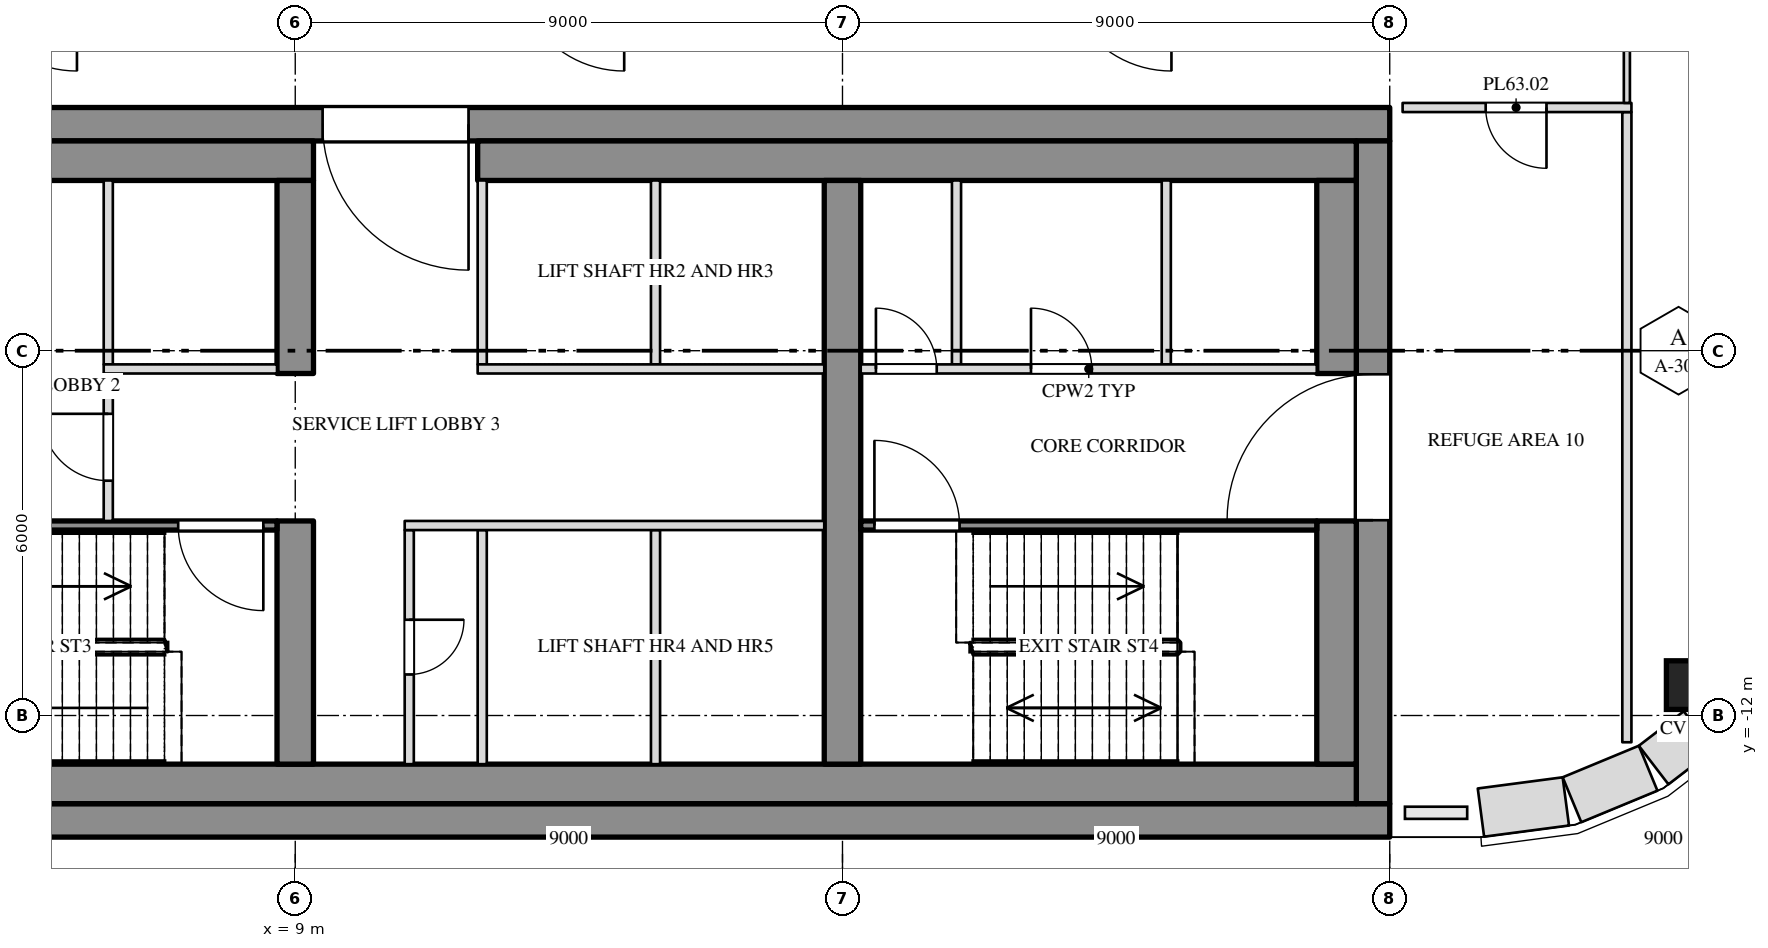
"""IFC4 building model, lengths in metres.
Left out: names, types, materials, properties, quantities, classifications, styles, units other than length and angle.
Written with IfcOpenShell. Run it as: python <this file> out.ifc"""

import sys

from ifc_helpers import new_model, si_unit, direction, frame, frame_2d, origin, origin_2d, place, context, subcontext, project, spatial, rectangle, extrude, element, fill, save


model = new_model("IFC4")
c1 = context("Model", 3, precision=1e-05, world=origin(), true_north=direction((0.0, 1.0)))
c2 = subcontext(c1, "Body", "Model", "MODEL_VIEW")
j1 = project(units=[si_unit("LENGTHUNIT", "METRE"), si_unit("PLANEANGLEUNIT", "RADIAN")], contexts=[c1])
p1 = place(None, origin())
s1 = spatial("IfcSite", under=j1, at=p1, CompositionType="ELEMENT")
p2 = place(p1, origin())
s2 = spatial("IfcBuilding", under=s1, at=p2, CompositionType="ELEMENT")
p3 = place(p2, frame((0.0, 0.0, 268.5)))
s3 = spatial("IfcBuildingStorey", under=s2, at=p3, CompositionType="ELEMENT", Elevation=268.5)
p4 = place(p3, frame((31.95, -11.5, 0.0), z_axis=(0.0, 0.0, 1.0), x_axis=(1.0, 0.0, 0.0)))
e1 = element("IfcColumn", 1, at=p4, inside=s3, PredefinedType="COLUMN", context=c2, shape_type="SweptSolid", body=[
    extrude(rectangle(XDim=0.8, YDim=0.8, at=origin_2d()), origin(), (0.0, 0.0, 1.0), 4.0),
])
p5 = place(p3, frame((-27.0, -2.275, 0.0), z_axis=(0.0, 0.0, 1.0), x_axis=(1.0, 0.0, 0.0)))
e2 = element("IfcWall", 2, at=p5, inside=s3, PredefinedType="SHEAR", context=c2, shape_type="SweptSolid", body=[
    extrude(rectangle(XDim=54.0, YDim=0.55, at=frame_2d((27.0, 0.0))), origin(), (0.0, 0.0, 1.0), 3.78),
])
p6 = place(p5, frame((15.15, 0.0, 0.0)))
e3 = element("IfcOpeningElement", 3, at=p6, cuts=e2, PredefinedType="OPENING", context=c2, shape_type="SweptSolid", body=[
    extrude(rectangle(XDim=2.4, YDim=2.1, at=frame_2d((1.2, 1.05))), frame((0.0, 0.287, 0.0), z_axis=(0.0, -1.0, 0.0), x_axis=(1.0, 0.0, 0.0)), (0.0, 0.0, 1.0), 0.574),
])
p7 = place(p5, frame((36.45, 0.0, 0.0)))
e4 = element("IfcOpeningElement", 4, at=p7, cuts=e2, PredefinedType="OPENING", context=c2, shape_type="SweptSolid", body=[
    extrude(rectangle(XDim=2.4, YDim=2.1, at=frame_2d((1.2, 1.05))), frame((0.0, 0.287, 0.0), z_axis=(0.0, -1.0, 0.0), x_axis=(1.0, 0.0, 0.0)), (0.0, 0.0, 1.0), 0.574),
])
p8 = place(p3, frame((-27.0, -13.725, 0.0), z_axis=(0.0, 0.0, 1.0), x_axis=(1.0, 0.0, 0.0)))
e5 = element("IfcWall", 5, at=p8, inside=s3, PredefinedType="SHEAR", context=c2, shape_type="SweptSolid", body=[
    extrude(rectangle(XDim=54.0, YDim=0.55, at=frame_2d((27.0, 0.0))), origin(), (0.0, 0.0, 1.0), 3.78),
])
p9 = place(p3, frame((26.725, -13.45, 0.0), z_axis=(0.0, 0.0, 1.0), x_axis=(0.0, 1.0, 0.0)))
e6 = element("IfcWall", 6, at=p9, inside=s3, PredefinedType="SHEAR", context=c2, shape_type="SweptSolid", body=[
    extrude(rectangle(XDim=10.9, YDim=0.55, at=frame_2d((5.45, 0.0))), origin(), (0.0, 0.0, 1.0), 3.78),
])
p10 = place(p9, frame((4.662, 0.0, 0.0)))
e7 = element("IfcOpeningElement", 7, at=p10, cuts=e6, PredefinedType="OPENING", context=c2, shape_type="SweptSolid", body=[
    extrude(rectangle(XDim=2.4, YDim=2.1, at=frame_2d((1.2, 1.05))), frame((0.0, 0.287, 0.0), z_axis=(0.0, -1.0, 0.0), x_axis=(1.0, 0.0, 0.0)), (0.0, 0.0, 1.0), 0.574),
])
p11 = place(p3, frame((-9.3, -2.875, 0.0), z_axis=(0.0, 0.0, 1.0), x_axis=(1.0, 0.0, 0.0)))
e8 = element("IfcWall", 8, at=p11, inside=s3, PredefinedType="SHEAR", context=c2, shape_type="SweptSolid", body=[
    extrude(rectangle(XDim=18.6, YDim=0.65, at=frame_2d((9.3, 0.0))), origin(), (0.0, 0.0, 1.0), 3.78),
])
p12 = place(p3, frame((12.0, -2.875, 0.0), z_axis=(0.0, 0.0, 1.0), x_axis=(1.0, 0.0, 0.0)))
e9 = element("IfcWall", 9, at=p12, inside=s3, PredefinedType="SHEAR", context=c2, shape_type="SweptSolid", body=[
    extrude(rectangle(XDim=14.45, YDim=0.65, at=frame_2d((7.225, 0.0))), origin(), (0.0, 0.0, 1.0), 3.78),
])
p13 = place(p3, frame((-26.45, -13.125, 0.0), z_axis=(0.0, 0.0, 1.0), x_axis=(1.0, 0.0, 0.0)))
e10 = element("IfcWall", 10, at=p13, inside=s3, PredefinedType="SHEAR", context=c2, shape_type="SweptSolid", body=[
    extrude(rectangle(XDim=52.9, YDim=0.65, at=frame_2d((26.45, 0.0))), origin(), (0.0, 0.0, 1.0), 3.78),
])
p14 = place(p3, frame((26.125, -12.8, 0.0), z_axis=(0.0, 0.0, 1.0), x_axis=(0.0, 1.0, 0.0)))
e11 = element("IfcWall", 11, at=p14, inside=s3, PredefinedType="SHEAR", context=c2, shape_type="SweptSolid", body=[
    extrude(rectangle(XDim=4.0, YDim=0.65, at=frame_2d((2.0, 0.0))), origin(), (0.0, 0.0, 1.0), 3.78),
])
p15 = place(p3, frame((26.125, -6.375, 0.0), z_axis=(0.0, 0.0, 1.0), x_axis=(0.0, 1.0, 0.0)))
e12 = element("IfcWall", 12, at=p15, inside=s3, PredefinedType="SHEAR", context=c2, shape_type="SweptSolid", body=[
    extrude(rectangle(XDim=3.175, YDim=0.65, at=frame_2d((1.587, 0.0))), origin(), (0.0, 0.0, 1.0), 3.78),
])
p16 = place(p3, frame((9.0, -12.8, 0.0), z_axis=(0.0, 0.0, 1.0), x_axis=(0.0, 1.0, 0.0)))
e13 = element("IfcWall", 13, at=p16, inside=s3, PredefinedType="SHEAR", context=c2, shape_type="SweptSolid", body=[
    extrude(rectangle(XDim=4.0, YDim=0.6, at=frame_2d((2.0, 0.0))), origin(), (0.0, 0.0, 1.0), 3.78),
])
p17 = place(p3, frame((9.0, -6.375, 0.0), z_axis=(0.0, 0.0, 1.0), x_axis=(0.0, 1.0, 0.0)))
e14 = element("IfcWall", 14, at=p17, inside=s3, PredefinedType="SHEAR", context=c2, shape_type="SweptSolid", body=[
    extrude(rectangle(XDim=3.175, YDim=0.6, at=frame_2d((1.587, 0.0))), origin(), (0.0, 0.0, 1.0), 3.78),
])
p18 = place(p3, frame((18.0, -12.8, 0.0), z_axis=(0.0, 0.0, 1.0), x_axis=(0.0, 1.0, 0.0)))
e15 = element("IfcWall", 15, at=p18, inside=s3, PredefinedType="SHEAR", context=c2, shape_type="SweptSolid", body=[
    extrude(rectangle(XDim=9.6, YDim=0.6, at=frame_2d((4.8, 0.0))), origin(), (0.0, 0.0, 1.0), 3.78),
])
p19 = place(p3, frame((30.9, -12.44, 0.0), z_axis=(0.0, 0.0, 1.0), x_axis=(0.0, 1.0, 0.0)))
e16 = element("IfcWall", 16, at=p19, inside=s3, PredefinedType="PARTITIONING", context=c2, shape_type="SweptSolid", body=[
    extrude(rectangle(XDim=10.365, YDim=0.15, at=frame_2d((5.183, 0.0))), origin(), (0.0, 0.0, 1.0), 3.78),
])
p20 = place(p3, frame((27.212, -2.0, 0.0), z_axis=(0.0, 0.0, 1.0), x_axis=(1.0, 0.0, 0.0)))
e17 = element("IfcWall", 17, at=p20, inside=s3, PredefinedType="PARTITIONING", context=c2, shape_type="SweptSolid", body=[
    extrude(rectangle(XDim=3.763, YDim=0.15, at=frame_2d((1.882, 0.0))), origin(), (0.0, 0.0, 1.0), 3.78),
])
p21 = place(p20, frame((1.366, 0.0, 0.0)))
e18 = element("IfcOpeningElement", 18, at=p21, cuts=e17, PredefinedType="OPENING", context=c2, shape_type="SweptSolid", body=[
    extrude(rectangle(XDim=1.0, YDim=2.1, at=frame_2d((0.5, 1.05))), frame((0.0, 0.087, 0.0), z_axis=(0.0, -1.0, 0.0), x_axis=(1.0, 0.0, 0.0)), (0.0, 0.0, 1.0), 0.174),
])
p22 = place(p3, frame((30.9, -1.925, 0.0), z_axis=(0.0, 0.0, 1.0), x_axis=(0.0, 1.0, 0.0)))
e19 = element("IfcWall", 19, at=p22, inside=s3, PredefinedType="PARTITIONING", context=c2, shape_type="SweptSolid", body=[
    extrude(rectangle(XDim=2.25, YDim=0.1, at=frame_2d((1.125, 0.0))), origin(), (0.0, 0.0, 1.0), 3.78),
])
p23 = place(p3, frame((28.5, -13.597, 0.0), z_axis=(0.0, 0.0, 1.0), x_axis=(0.99144603414, 0.130517283865, 0.0)))
e20 = element("IfcWall", 20, at=p23, inside=s3, PredefinedType="SOLIDWALL", context=c2, shape_type="SweptSolid", body=[
    extrude(rectangle(XDim=1.408, YDim=0.8, at=frame_2d((0.704, 0.0))), origin(), (0.0, 0.0, 1.0), 3.78),
])
p24 = place(p3, frame((29.997, -13.386, 0.0), z_axis=(0.0, 0.0, 1.0), x_axis=(0.923847774587, 0.38276009378, 0.0)))
e21 = element("IfcWall", 21, at=p24, inside=s3, PredefinedType="SOLIDWALL", context=c2, shape_type="SweptSolid", body=[
    extrude(rectangle(XDim=1.355, YDim=0.8, at=frame_2d((0.678, 0.0))), origin(), (0.0, 0.0, 1.0), 3.78),
])
p25 = place(p3, frame((31.34, -12.815, 0.0), z_axis=(0.0, 0.0, 1.0), x_axis=(0.793344662299, 0.608772738221, 0.0)))
e22 = element("IfcWall", 22, at=p25, inside=s3, PredefinedType="SOLIDWALL", context=c2, shape_type="SweptSolid", body=[
    extrude(rectangle(XDim=0.931, YDim=0.8, at=frame_2d((0.466, 0.0))), origin(), (0.0, 0.0, 1.0), 3.78),
])
for number, where, z_axis, x_axis in (
    (23, (5.925, -6.225, 0.0), (0.0, 0.0, 1.0), (0.0, 1.0, 0.0)),
    (24, (12.075, -6.225, 0.0), (0.0, 0.0, 1.0), (0.0, 1.0, 0.0)),
    (25, (14.925, -6.225, 0.0), (0.0, 0.0, 1.0), (0.0, 1.0, 0.0)),
    (26, (19.875, -6.225, 0.0), (0.0, 0.0, 1.0), (0.0, 1.0, 0.0)),
    (27, (23.325, -6.225, 0.0), (0.0, 0.0, 1.0), (0.0, 1.0, 0.0)),
):
    element("IfcWall", number, at=place(p3, frame(where, z_axis=z_axis, x_axis=x_axis)), inside=s3, PredefinedType="PARTITIONING", context=c2, shape_type="SweptSolid", body=[
        extrude(rectangle(XDim=3.025, YDim=0.15, at=frame_2d((1.513, 0.0))), origin(), (0.0, 0.0, 1.0), 3.78),
    ])
p26 = place(p3, frame((10.875, -12.8, 0.0), z_axis=(0.0, 0.0, 1.0), x_axis=(0.0, 1.0, 0.0)))
e28 = element("IfcWall", 28, at=p26, inside=s3, PredefinedType="PARTITIONING", context=c2, shape_type="SweptSolid", body=[
    extrude(rectangle(XDim=3.85, YDim=0.15, at=frame_2d((1.925, 0.0))), origin(), (0.0, 0.0, 1.0), 3.78),
])
p27 = place(p26, frame((1.475, 0.0, 0.0)))
e29 = element("IfcOpeningElement", 29, at=p27, cuts=e28, PredefinedType="OPENING", context=c2, shape_type="SweptSolid", body=[
    extrude(rectangle(XDim=0.9, YDim=2.1, at=frame_2d((0.45, 1.05))), frame((0.0, 0.087, 0.0), z_axis=(0.0, -1.0, 0.0), x_axis=(1.0, 0.0, 0.0)), (0.0, 0.0, 1.0), 0.174),
])
for number, where, z_axis, x_axis in (
    (30, (12.075, -12.8, 0.0), (0.0, 0.0, 1.0), (0.0, 1.0, 0.0)),
    (31, (14.925, -12.8, 0.0), (0.0, 0.0, 1.0), (0.0, 1.0, 0.0)),
):
    element("IfcWall", number, at=place(p3, frame(where, z_axis=z_axis, x_axis=x_axis)), inside=s3, PredefinedType="PARTITIONING", context=c2, shape_type="SweptSolid", body=[
        extrude(rectangle(XDim=3.85, YDim=0.15, at=frame_2d((1.925, 0.0))), origin(), (0.0, 0.0, 1.0), 3.78),
    ])
p28 = place(p3, frame((5.925, -8.8, 0.0), z_axis=(0.0, 0.0, 1.0), x_axis=(0.0, 1.0, 0.0)))
e32 = element("IfcWall", 32, at=p28, inside=s3, PredefinedType="PARTITIONING", context=c2, shape_type="SweptSolid", body=[
    extrude(rectangle(XDim=2.425, YDim=0.15, at=frame_2d((1.212, 0.0))), origin(), (0.0, 0.0, 1.0), 3.78),
])
p29 = place(p28, frame((0.662, 0.0, 0.0)))
e33 = element("IfcOpeningElement", 33, at=p29, cuts=e32, PredefinedType="OPENING", context=c2, shape_type="SweptSolid", body=[
    extrude(rectangle(XDim=1.1, YDim=2.1, at=frame_2d((0.55, 1.05))), frame((0.0, 0.087, 0.0), z_axis=(0.0, -1.0, 0.0), x_axis=(1.0, 0.0, 0.0)), (0.0, 0.0, 1.0), 0.174),
])
p30 = place(p3, frame((5.85, -6.3, 0.0), z_axis=(0.0, 0.0, 1.0), x_axis=(1.0, 0.0, 0.0)))
e34 = element("IfcWall", 34, at=p30, inside=s3, PredefinedType="PARTITIONING", context=c2, shape_type="SweptSolid", body=[
    extrude(rectangle(XDim=2.85, YDim=0.15, at=frame_2d((1.425, 0.0))), origin(), (0.0, 0.0, 1.0), 3.78),
])
p31 = place(p3, frame((12.0, -6.3, 0.0), z_axis=(0.0, 0.0, 1.0), x_axis=(1.0, 0.0, 0.0)))
e35 = element("IfcWall", 35, at=p31, inside=s3, PredefinedType="PARTITIONING", context=c2, shape_type="SweptSolid", body=[
    extrude(rectangle(XDim=5.7, YDim=0.15, at=frame_2d((2.85, 0.0))), origin(), (0.0, 0.0, 1.0), 3.78),
])
p32 = place(p3, frame((18.3, -6.3, 0.0), z_axis=(0.0, 0.0, 1.0), x_axis=(1.0, 0.0, 0.0)))
e36 = element("IfcWall", 36, at=p32, inside=s3, PredefinedType="PARTITIONING", context=c2, shape_type="SweptSolid", body=[
    extrude(rectangle(XDim=7.5, YDim=0.15, at=frame_2d((3.75, 0.0))), origin(), (0.0, 0.0, 1.0), 3.78),
])
p33 = place(p32, frame((0.25, 0.0, 0.0)))
e37 = element("IfcOpeningElement", 37, at=p33, cuts=e36, PredefinedType="OPENING", context=c2, shape_type="SweptSolid", body=[
    extrude(rectangle(XDim=1.0, YDim=2.1, at=frame_2d((0.5, 1.05))), frame((0.0, 0.087, 0.0), z_axis=(0.0, -1.0, 0.0), x_axis=(1.0, 0.0, 0.0)), (0.0, 0.0, 1.0), 0.174),
])
p34 = place(p32, frame((2.8, 0.0, 0.0)))
e38 = element("IfcOpeningElement", 38, at=p34, cuts=e36, PredefinedType="OPENING", context=c2, shape_type="SweptSolid", body=[
    extrude(rectangle(XDim=1.0, YDim=2.1, at=frame_2d((0.5, 1.05))), frame((0.0, 0.087, 0.0), z_axis=(0.0, -1.0, 0.0), x_axis=(1.0, 0.0, 0.0)), (0.0, 0.0, 1.0), 0.174),
])
p35 = place(p3, frame((0.3, -8.875, 0.0), z_axis=(0.0, 0.0, 1.0), x_axis=(1.0, 0.0, 0.0)))
e39 = element("IfcWall", 39, at=p35, inside=s3, PredefinedType="SHEAR", context=c2, shape_type="SweptSolid", body=[
    extrude(rectangle(XDim=8.4, YDim=0.15, at=frame_2d((4.2, 0.0))), origin(), (0.0, 0.0, 1.0), 3.78),
])
p36 = place(p35, frame((6.775, 0.0, 0.0)))
e40 = element("IfcOpeningElement", 40, at=p36, cuts=e39, PredefinedType="OPENING", context=c2, shape_type="SweptSolid", body=[
    extrude(rectangle(XDim=1.4, YDim=2.1, at=frame_2d((0.7, 1.05))), frame((0.0, 0.087, 0.0), z_axis=(0.0, -1.0, 0.0), x_axis=(1.0, 0.0, 0.0)), (0.0, 0.0, 1.0), 0.174),
])
p37 = place(p3, frame((10.8, -8.875, 0.0), z_axis=(0.0, 0.0, 1.0), x_axis=(1.0, 0.0, 0.0)))
e41 = element("IfcWall", 41, at=p37, inside=s3, PredefinedType="PARTITIONING", context=c2, shape_type="SweptSolid", body=[
    extrude(rectangle(XDim=6.9, YDim=0.15, at=frame_2d((3.45, 0.0))), origin(), (0.0, 0.0, 1.0), 3.78),
])
p38 = place(p3, frame((18.3, -8.875, 0.0), z_axis=(0.0, 0.0, 1.0), x_axis=(1.0, 0.0, 0.0)))
e42 = element("IfcWall", 42, at=p38, inside=s3, PredefinedType="SHEAR", context=c2, shape_type="SweptSolid", body=[
    extrude(rectangle(XDim=7.5, YDim=0.15, at=frame_2d((3.75, 0.0))), origin(), (0.0, 0.0, 1.0), 3.78),
])
p39 = place(p38, frame((0.225, 0.0, 0.0)))
e43 = element("IfcOpeningElement", 43, at=p39, cuts=e42, PredefinedType="OPENING", context=c2, shape_type="SweptSolid", body=[
    extrude(rectangle(XDim=1.4, YDim=2.1, at=frame_2d((0.7, 1.05))), frame((0.0, 0.087, 0.0), z_axis=(0.0, -1.0, 0.0), x_axis=(1.0, 0.0, 0.0)), (0.0, 0.0, 1.0), 0.174),
])
p40 = place(p21, origin())
e44 = element("IfcDoor", 44, at=p40, inside=s3, OperationType="SINGLE_SWING_LEFT", PredefinedType="DOOR", context=c2, shape_type="SweptSolid", body=[
    extrude(rectangle(XDim=1.0, YDim=2.1, at=frame_2d((0.5, 1.05))), frame((0.0, 0.025, 0.0), z_axis=(0.0, -1.0, 0.0), x_axis=(1.0, 0.0, 0.0)), (0.0, 0.0, 1.0), 0.05),
])
fill(e18, e44)
p41 = place(p29, origin())
e45 = element("IfcDoor", 45, at=p41, inside=s3, OperationType="SINGLE_SWING_RIGHT", PredefinedType="DOOR", context=c2, shape_type="SweptSolid", body=[
    extrude(rectangle(XDim=1.1, YDim=2.1, at=frame_2d((0.55, 1.05))), frame((0.0, 0.025, 0.0), z_axis=(0.0, -1.0, 0.0), x_axis=(1.0, 0.0, 0.0)), (0.0, 0.0, 1.0), 0.05),
])
fill(e33, e45)
p42 = place(p36, origin())
e46 = element("IfcDoor", 46, at=p42, inside=s3, OperationType="DOUBLE_DOOR_SINGLE_SWING", PredefinedType="DOOR", context=c2, shape_type="SweptSolid", body=[
    extrude(rectangle(XDim=1.4, YDim=2.1, at=frame_2d((0.7, 1.05))), frame((0.0, 0.025, 0.0), z_axis=(0.0, -1.0, 0.0), x_axis=(1.0, 0.0, 0.0)), (0.0, 0.0, 1.0), 0.05),
])
fill(e40, e46)
p43 = place(p7, origin())
e47 = element("IfcDoor", 47, at=p43, inside=s3, OperationType="DOUBLE_DOOR_SINGLE_SWING", PredefinedType="DOOR", context=c2, shape_type="SweptSolid", body=[
    extrude(rectangle(XDim=2.4, YDim=2.1, at=frame_2d((1.2, 1.05))), frame((0.0, 0.025, 0.0), z_axis=(0.0, -1.0, 0.0), x_axis=(1.0, 0.0, 0.0)), (0.0, 0.0, 1.0), 0.05),
])
fill(e4, e47)
p44 = place(p27, origin())
e48 = element("IfcDoor", 48, at=p44, inside=s3, OperationType="SINGLE_SWING_LEFT", PredefinedType="DOOR", context=c2, shape_type="SweptSolid", body=[
    extrude(rectangle(XDim=0.9, YDim=2.1, at=frame_2d((0.45, 1.05))), frame((0.0, 0.025, 0.0), z_axis=(0.0, -1.0, 0.0), x_axis=(1.0, 0.0, 0.0)), (0.0, 0.0, 1.0), 0.05),
])
fill(e29, e48)
p45 = place(p33, origin())
e49 = element("IfcDoor", 49, at=p45, inside=s3, OperationType="SINGLE_SWING_LEFT", PredefinedType="DOOR", context=c2, shape_type="SweptSolid", body=[
    extrude(rectangle(XDim=1.0, YDim=2.1, at=frame_2d((0.5, 1.05))), frame((0.0, 0.025, 0.0), z_axis=(0.0, -1.0, 0.0), x_axis=(1.0, 0.0, 0.0)), (0.0, 0.0, 1.0), 0.05),
])
fill(e37, e49)
p46 = place(p39, origin())
e50 = element("IfcDoor", 50, at=p46, inside=s3, OperationType="DOUBLE_DOOR_SINGLE_SWING", PredefinedType="DOOR", context=c2, shape_type="SweptSolid", body=[
    extrude(rectangle(XDim=1.4, YDim=2.1, at=frame_2d((0.7, 1.05))), frame((0.0, 0.025, 0.0), z_axis=(0.0, -1.0, 0.0), x_axis=(1.0, 0.0, 0.0)), (0.0, 0.0, 1.0), 0.05),
])
fill(e43, e50)
p47 = place(p34, origin())
e51 = element("IfcDoor", 51, at=p47, inside=s3, OperationType="SINGLE_SWING_LEFT", PredefinedType="DOOR", context=c2, shape_type="SweptSolid", body=[
    extrude(rectangle(XDim=1.0, YDim=2.1, at=frame_2d((0.5, 1.05))), frame((0.0, 0.025, 0.0), z_axis=(0.0, -1.0, 0.0), x_axis=(1.0, 0.0, 0.0)), (0.0, 0.0, 1.0), 0.05),
])
fill(e38, e51)
p48 = place(p10, origin())
e52 = element("IfcDoor", 52, at=p48, inside=s3, OperationType="DOUBLE_DOOR_SINGLE_SWING", PredefinedType="DOOR", context=c2, shape_type="SweptSolid", body=[
    extrude(rectangle(XDim=2.4, YDim=2.1, at=frame_2d((1.2, 1.05))), frame((0.0, 0.025, 0.0), z_axis=(0.0, -1.0, 0.0), x_axis=(1.0, 0.0, 0.0)), (0.0, 0.0, 1.0), 0.05),
])
fill(e7, e52)
save(model, sys.argv[1])
